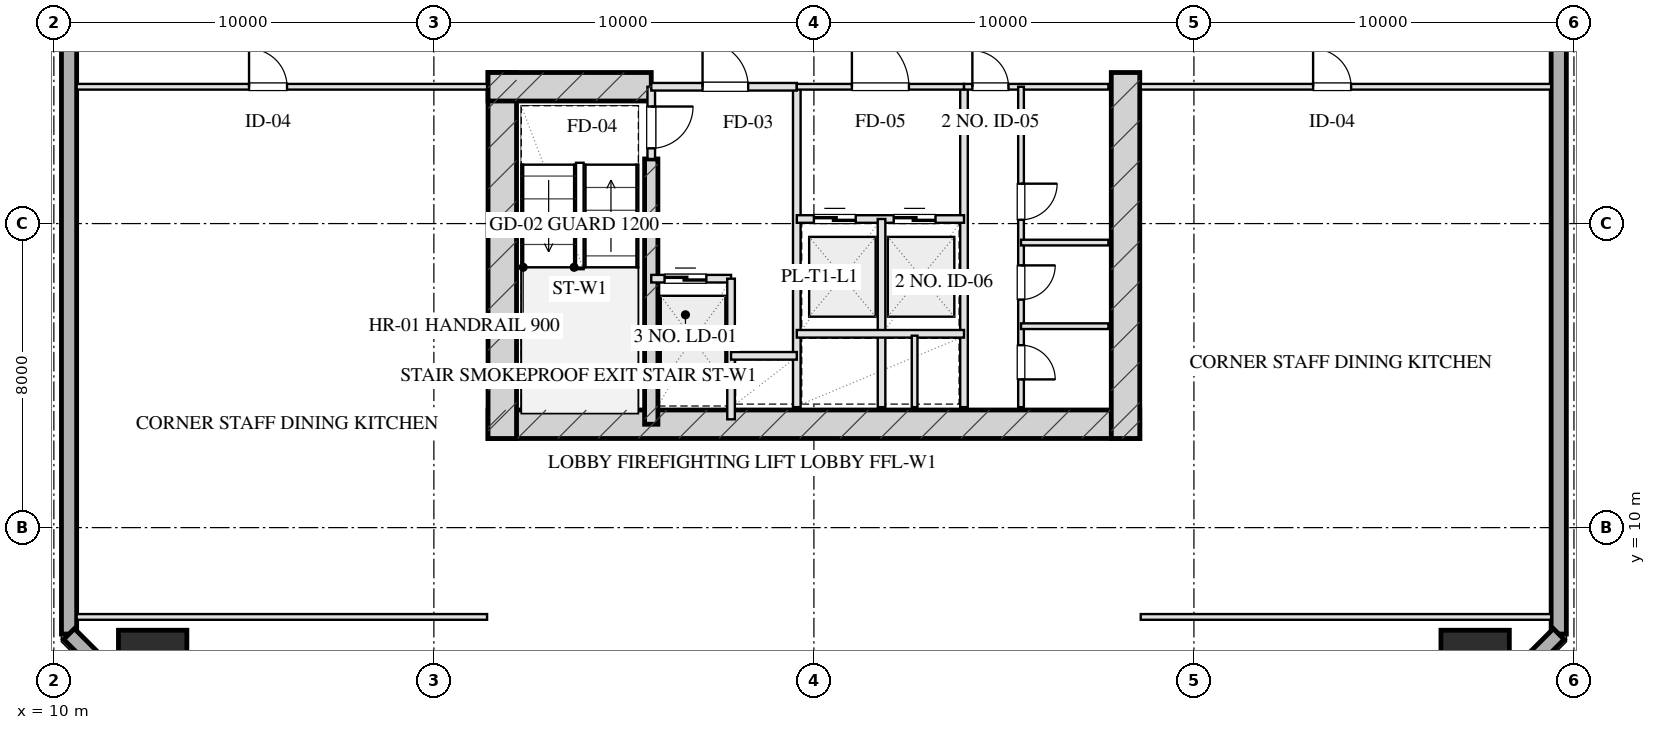
"""IFC4 building model, lengths in metres.
Left out: names, types, materials, properties, quantities, classifications, styles, units other than length and angle.
Written with IfcOpenShell. Run it as: python <this file> out.ifc"""

import sys

from ifc_helpers import new_model, si_unit, direction, frame, frame_2d, origin, origin_2d, place, context, subcontext, project, spatial, rectangle, hollow_rectangle, extrude, element, fill, save


model = new_model("IFC4")
c1 = context("Model", 3, precision=1e-05, world=origin(), true_north=direction((0.0, 1.0)))
c2 = subcontext(c1, "Body", "Model", "MODEL_VIEW")
j1 = project(units=[si_unit("LENGTHUNIT", "METRE"), si_unit("PLANEANGLEUNIT", "RADIAN")], contexts=[c1])
p1 = place(None, origin())
s1 = spatial("IfcSite", under=j1, at=p1, CompositionType="ELEMENT")
p2 = place(p1, origin())
s2 = spatial("IfcBuilding", under=s1, at=p2, CompositionType="ELEMENT")
p3 = place(p2, frame((0.0, 0.0, 64.4)))
s3 = spatial("IfcBuildingStorey", under=s2, at=p3, CompositionType="ELEMENT", Elevation=64.4)
p4 = place(p3, frame((21.425, 12.72, 0.0), z_axis=(0.0, 0.0, 1.0), x_axis=(1.0, 0.0, 0.0)))
e1 = element("IfcWall", 1, at=p4, inside=s3, PredefinedType="SHEAR", context=c2, shape_type="SweptSolid", body=[
    extrude(rectangle(XDim=17.15, YDim=0.75, at=frame_2d((8.575, 0.0))), origin(), (0.0, 0.0, 1.0), 3.45),
])
for number, where, z_axis, x_axis in (
    (2, (21.8, 21.975, 0.0), (0.0, 0.0, 1.0), (0.0, -1.0, 0.0)),
    (3, (38.2, 21.975, 0.0), (0.0, 0.0, 1.0), (0.0, -1.0, 0.0)),
):
    element("IfcWall", number, at=place(p3, frame(where, z_axis=z_axis, x_axis=x_axis)), inside=s3, PredefinedType="SHEAR", context=c2, shape_type="SweptSolid", body=[
        extrude(rectangle(XDim=9.63, YDim=0.75, at=frame_2d((4.815, 0.0))), origin(), (0.0, 0.0, 1.0), 3.45),
    ])
p5 = place(p3, frame((25.72, 19.7, 0.0), z_axis=(0.0, 0.0, 1.0), x_axis=(0.0, -1.0, 0.0)))
e4 = element("IfcWall", 4, at=p5, inside=s3, PredefinedType="SHEAR", context=c2, shape_type="SweptSolid", body=[
    extrude(rectangle(XDim=6.98, YDim=0.35, at=frame_2d((3.49, 0.0))), origin(), (0.0, 0.0, 1.0), 3.45),
])
p6 = place(p3, frame((21.425, 21.6, 0.0), z_axis=(0.0, 0.0, 1.0), x_axis=(1.0, 0.0, 0.0)))
e5 = element("IfcWall", 5, at=p6, inside=s3, PredefinedType="SHEAR", context=c2, shape_type="SweptSolid", body=[
    extrude(rectangle(XDim=4.295, YDim=0.75, at=frame_2d((2.147, 0.0))), origin(), (0.0, 0.0, 1.0), 3.45),
])
for number, where, z_axis, x_axis in (
    (6, (12.6, 6.4, 0.0), (0.0, 0.0, 1.0), (1.0, 0.0, 0.0)),
    (7, (47.4, 6.4, 0.0), (0.0, 0.0, 1.0), (1.0, 0.0, 0.0)),
):
    element("IfcColumn", number, at=place(p3, frame(where, z_axis=z_axis, x_axis=x_axis)), inside=s3, PredefinedType="COLUMN", context=c2, shape_type="SweptSolid", body=[
        extrude(hollow_rectangle(XDim=1.8, YDim=1.8, WallThickness=0.06, at=origin_2d()), origin(), (0.0, 0.0, 1.0), 3.451),
    ])
p7 = place(p3, frame((10.4, 7.2, 0.0), z_axis=(0.0, 0.0, 1.0), x_axis=(0.0, 1.0, 0.0)))
e8 = element("IfcWall", 8, at=p7, inside=s3, PredefinedType="SOLIDWALL", context=c2, shape_type="SweptSolid", body=[
    extrude(rectangle(XDim=53.6, YDim=0.4, at=frame_2d((26.8, 0.0))), origin(), (0.0, 0.0, 1.0), 2.61),
])
p8 = place(p7, frame((19.15, 0.0, 0.75)))
e9 = element("IfcOpeningElement", 9, at=p8, cuts=e8, PredefinedType="OPENING", context=c2, shape_type="SweptSolid", body=[
    extrude(rectangle(XDim=2.5, YDim=1.46, at=frame_2d((1.25, 0.73))), frame((0.0, 0.21, 0.0), z_axis=(0.0, -1.0, 0.0), x_axis=(1.0, 0.0, 0.0)), (0.0, 0.0, 1.0), 0.42),
])
p9 = place(p7, frame((31.95, 0.0, 0.75)))
e10 = element("IfcOpeningElement", 10, at=p9, cuts=e8, PredefinedType="OPENING", context=c2, shape_type="SweptSolid", body=[
    extrude(rectangle(XDim=2.5, YDim=1.46, at=frame_2d((1.25, 0.73))), frame((0.0, 0.21, 0.0), z_axis=(0.0, -1.0, 0.0), x_axis=(1.0, 0.0, 0.0)), (0.0, 0.0, 1.0), 0.42),
])
p10 = place(p3, frame((49.6, 60.8, 0.0), z_axis=(0.0, 0.0, 1.0), x_axis=(0.0, -1.0, 0.0)))
e11 = element("IfcWall", 11, at=p10, inside=s3, PredefinedType="SOLIDWALL", context=c2, shape_type="SweptSolid", body=[
    extrude(rectangle(XDim=53.6, YDim=0.4, at=frame_2d((26.8, 0.0))), origin(), (0.0, 0.0, 1.0), 2.61),
])
p11 = place(p10, frame((28.15, 0.0, 0.75)))
e12 = element("IfcOpeningElement", 12, at=p11, cuts=e11, PredefinedType="OPENING", context=c2, shape_type="SweptSolid", body=[
    extrude(rectangle(XDim=2.5, YDim=1.46, at=frame_2d((1.25, 0.73))), frame((0.0, 0.21, 0.0), z_axis=(0.0, -1.0, 0.0), x_axis=(1.0, 0.0, 0.0)), (0.0, 0.0, 1.0), 0.42),
])
p12 = place(p10, frame((22.95, 0.0, 0.75)))
e13 = element("IfcOpeningElement", 13, at=p12, cuts=e11, PredefinedType="OPENING", context=c2, shape_type="SweptSolid", body=[
    extrude(rectangle(XDim=2.5, YDim=1.46, at=frame_2d((1.25, 0.73))), frame((0.0, 0.21, 0.0), z_axis=(0.0, -1.0, 0.0), x_axis=(1.0, 0.0, 0.0)), (0.0, 0.0, 1.0), 0.42),
])
for number, where, z_axis, x_axis in (
    (14, (49.6, 7.2, 0.0), (0.0, 0.0, 1.0), (-0.707, -0.707, 0.0)),
    (15, (13.4, 4.2, 0.0), (0.0, 0.0, 1.0), (-0.707, 0.707, 0.0)),
):
    element("IfcWall", number, at=place(p3, frame(where, z_axis=z_axis, x_axis=x_axis)), inside=s3, PredefinedType="SOLIDWALL", context=c2, shape_type="SweptSolid", body=[
        extrude(rectangle(XDim=4.243, YDim=0.4, at=frame_2d((2.121, 0.0))), origin(), (0.0, 0.0, 1.0), 2.61),
    ])
p13 = place(p3, frame((25.72, 21.6, 0.0), z_axis=(0.0, 0.0, 1.0), x_axis=(0.0, -1.0, 0.0)))
e16 = element("IfcWall", 16, at=p13, inside=s3, PredefinedType="PARTITIONING", context=c2, shape_type="SweptSolid", body=[
    extrude(rectangle(XDim=1.9, YDim=0.2, at=frame_2d((0.95, 0.0))), origin(), (0.0, 0.0, 1.0), 3.175),
])
p14 = place(p13, frame((0.52, 0.0, 0.0)))
e17 = element("IfcOpeningElement", 17, at=p14, cuts=e16, PredefinedType="OPENING", context=c2, shape_type="SweptSolid", body=[
    extrude(rectangle(XDim=1.1, YDim=2.05, at=frame_2d((0.55, 1.025))), frame((0.0, 0.11, 0.0), z_axis=(0.0, -1.0, 0.0), x_axis=(1.0, 0.0, 0.0)), (0.0, 0.0, 1.0), 0.22),
])
p15 = place(p3, frame((29.55, 21.6, 0.0), z_axis=(0.0, 0.0, 1.0), x_axis=(0.0, -1.0, 0.0)))
e18 = element("IfcWall", 18, at=p15, inside=s3, PredefinedType="PARTITIONING", context=c2, shape_type="SweptSolid", body=[
    extrude(rectangle(XDim=8.43, YDim=0.2, at=frame_2d((4.215, 0.0))), origin(), (0.0, 0.0, 1.0), 3.175),
])
p16 = place(p3, frame((25.72, 21.6, 0.0), z_axis=(0.0, 0.0, 1.0), x_axis=(1.0, 0.0, 0.0)))
e19 = element("IfcWall", 19, at=p16, inside=s3, PredefinedType="PARTITIONING", context=c2, shape_type="SweptSolid", body=[
    extrude(rectangle(XDim=3.83, YDim=0.2, at=frame_2d((1.915, 0.0))), origin(), (0.0, 0.0, 1.0), 3.175),
])
p17 = place(p16, frame((1.35, 0.0, 0.0)))
e20 = element("IfcOpeningElement", 20, at=p17, cuts=e19, PredefinedType="OPENING", context=c2, shape_type="SweptSolid", body=[
    extrude(rectangle(XDim=1.2, YDim=2.05, at=frame_2d((0.6, 1.025))), frame((0.0, 0.11, 0.0), z_axis=(0.0, -1.0, 0.0), x_axis=(1.0, 0.0, 0.0)), (0.0, 0.0, 1.0), 0.22),
])
p18 = place(p3, frame((25.72, 16.55, 0.0), z_axis=(0.0, 0.0, 1.0), x_axis=(1.0, 0.0, 0.0)))
e21 = element("IfcWall", 21, at=p18, inside=s3, PredefinedType="PARTITIONING", context=c2, shape_type="SweptSolid", body=[
    extrude(rectangle(XDim=2.1, YDim=0.2, at=frame_2d((1.05, 0.0))), origin(), (0.0, 0.0, 1.0), 3.175),
])
p19 = place(p18, frame((0.35, 0.0, 0.0)))
e22 = element("IfcOpeningElement", 22, at=p19, cuts=e21, PredefinedType="OPENING", context=c2, shape_type="SweptSolid", body=[
    extrude(rectangle(XDim=1.1, YDim=2.05, at=frame_2d((0.55, 1.025))), frame((0.0, 0.11, 0.0), z_axis=(0.0, -1.0, 0.0), x_axis=(1.0, 0.0, 0.0)), (0.0, 0.0, 1.0), 0.22),
])
p20 = place(p3, frame((27.82, 16.55, 0.0), z_axis=(0.0, 0.0, 1.0), x_axis=(0.0, -1.0, 0.0)))
e23 = element("IfcWall", 23, at=p20, inside=s3, PredefinedType="PARTITIONING", context=c2, shape_type="SweptSolid", body=[
    extrude(rectangle(XDim=3.7, YDim=0.2, at=frame_2d((1.85, 0.0))), origin(), (0.0, 0.0, 1.0), 3.175),
])
p21 = place(p3, frame((27.82, 14.52, 0.0), z_axis=(0.0, 0.0, 1.0), x_axis=(1.0, 0.0, 0.0)))
e24 = element("IfcWall", 24, at=p21, inside=s3, PredefinedType="PARTITIONING", context=c2, shape_type="SweptSolid", body=[
    extrude(rectangle(XDim=1.73, YDim=0.2, at=frame_2d((0.865, 0.0))), origin(), (0.0, 0.0, 1.0), 3.175),
])
p22 = place(p3, frame((33.95, 21.6, 0.0), z_axis=(0.0, 0.0, 1.0), x_axis=(0.0, -1.0, 0.0)))
e25 = element("IfcWall", 25, at=p22, inside=s3, PredefinedType="PARTITIONING", context=c2, shape_type="SweptSolid", body=[
    extrude(rectangle(XDim=8.43, YDim=0.2, at=frame_2d((4.215, 0.0))), origin(), (0.0, 0.0, 1.0), 3.175),
])
p23 = place(p3, frame((29.55, 21.6, 0.0), z_axis=(0.0, 0.0, 1.0), x_axis=(1.0, 0.0, 0.0)))
e26 = element("IfcWall", 26, at=p23, inside=s3, PredefinedType="PARTITIONING", context=c2, shape_type="SweptSolid", body=[
    extrude(rectangle(XDim=4.4, YDim=0.15, at=frame_2d((2.2, 0.0))), origin(), (0.0, 0.0, 1.0), 3.175),
])
p24 = place(p23, frame((1.45, 0.0, 0.0)))
e27 = element("IfcOpeningElement", 27, at=p24, cuts=e26, PredefinedType="OPENING", context=c2, shape_type="SweptSolid", body=[
    extrude(rectangle(XDim=1.5, YDim=2.05, at=frame_2d((0.75, 1.025))), frame((0.0, 0.085, 0.0), z_axis=(0.0, -1.0, 0.0), x_axis=(1.0, 0.0, 0.0)), (0.0, 0.0, 1.0), 0.17),
])
p25 = place(p3, frame((29.55, 18.12, 0.0), z_axis=(0.0, 0.0, 1.0), x_axis=(1.0, 0.0, 0.0)))
e28 = element("IfcWall", 28, at=p25, inside=s3, PredefinedType="PARTITIONING", context=c2, shape_type="SweptSolid", body=[
    extrude(rectangle(XDim=4.4, YDim=0.2, at=frame_2d((2.2, 0.0))), origin(), (0.0, 0.0, 1.0), 3.175),
])
p26 = place(p25, frame((0.45, 0.0, 0.0)))
e29 = element("IfcOpeningElement", 29, at=p26, cuts=e28, PredefinedType="OPENING", context=c2, shape_type="SweptSolid", body=[
    extrude(rectangle(XDim=1.1, YDim=2.05, at=frame_2d((0.55, 1.025))), frame((0.0, 0.11, 0.0), z_axis=(0.0, -1.0, 0.0), x_axis=(1.0, 0.0, 0.0)), (0.0, 0.0, 1.0), 0.22),
])
p27 = place(p25, frame((2.55, 0.0, 0.0)))
e30 = element("IfcOpeningElement", 30, at=p27, cuts=e28, PredefinedType="OPENING", context=c2, shape_type="SweptSolid", body=[
    extrude(rectangle(XDim=1.1, YDim=2.05, at=frame_2d((0.55, 1.025))), frame((0.0, 0.11, 0.0), z_axis=(0.0, -1.0, 0.0), x_axis=(1.0, 0.0, 0.0)), (0.0, 0.0, 1.0), 0.22),
])
p28 = place(p3, frame((31.78, 18.12, 0.0), z_axis=(0.0, 0.0, 1.0), x_axis=(0.0, -1.0, 0.0)))
e31 = element("IfcWall", 31, at=p28, inside=s3, PredefinedType="PARTITIONING", context=c2, shape_type="SweptSolid", body=[
    extrude(rectangle(XDim=4.95, YDim=0.2, at=frame_2d((2.475, 0.0))), origin(), (0.0, 0.0, 1.0), 3.175),
])
p29 = place(p3, frame((29.55, 15.1, 0.0), z_axis=(0.0, 0.0, 1.0), x_axis=(1.0, 0.0, 0.0)))
e32 = element("IfcWall", 32, at=p29, inside=s3, PredefinedType="PARTITIONING", context=c2, shape_type="SweptSolid", body=[
    extrude(rectangle(XDim=4.4, YDim=0.2, at=frame_2d((2.2, 0.0))), origin(), (0.0, 0.0, 1.0), 3.175),
])
p30 = place(p3, frame((32.65, 15.05, 0.0), z_axis=(0.0, 0.0, 1.0), x_axis=(0.0, -1.0, 0.0)))
e33 = element("IfcWall", 33, at=p30, inside=s3, PredefinedType="PARTITIONING", context=c2, shape_type="SweptSolid", body=[
    extrude(rectangle(XDim=1.88, YDim=0.15, at=frame_2d((0.94, 0.0))), origin(), (0.0, 0.0, 1.0), 3.175),
])
p31 = place(p3, frame((33.95, 21.6, 0.0), z_axis=(0.0, 0.0, 1.0), x_axis=(1.0, 0.0, 0.0)))
e34 = element("IfcWall", 34, at=p31, inside=s3, PredefinedType="PARTITIONING", context=c2, shape_type="SweptSolid", body=[
    extrude(rectangle(XDim=3.8, YDim=0.15, at=frame_2d((1.9, 0.0))), origin(), (0.0, 0.0, 1.0), 3.175),
])
p32 = place(p31, frame((0.22, 0.0, 0.0)))
e35 = element("IfcOpeningElement", 35, at=p32, cuts=e34, PredefinedType="OPENING", context=c2, shape_type="SweptSolid", body=[
    extrude(rectangle(XDim=0.95, YDim=2.05, at=frame_2d((0.475, 1.025))), frame((0.0, 0.085, 0.0), z_axis=(0.0, -1.0, 0.0), x_axis=(1.0, 0.0, 0.0)), (0.0, 0.0, 1.0), 0.17),
])
p33 = place(p3, frame((35.45, 21.6, 0.0), z_axis=(0.0, 0.0, 1.0), x_axis=(0.0, -1.0, 0.0)))
e36 = element("IfcWall", 36, at=p33, inside=s3, PredefinedType="PARTITIONING", context=c2, shape_type="SweptSolid", body=[
    extrude(rectangle(XDim=8.43, YDim=0.15, at=frame_2d((4.215, 0.0))), origin(), (0.0, 0.0, 1.0), 2.815),
])
p34 = place(p33, frame((2.55, 0.0, 0.0)))
e37 = element("IfcOpeningElement", 37, at=p34, cuts=e36, PredefinedType="OPENING", context=c2, shape_type="SweptSolid", body=[
    extrude(rectangle(XDim=0.95, YDim=2.05, at=frame_2d((0.475, 1.025))), frame((0.0, 0.085, 0.0), z_axis=(0.0, -1.0, 0.0), x_axis=(1.0, 0.0, 0.0)), (0.0, 0.0, 1.0), 0.17),
])
p35 = place(p33, frame((4.7, 0.0, 0.0)))
e38 = element("IfcOpeningElement", 38, at=p35, cuts=e36, PredefinedType="OPENING", context=c2, shape_type="SweptSolid", body=[
    extrude(rectangle(XDim=0.9, YDim=2.05, at=frame_2d((0.45, 1.025))), frame((0.0, 0.085, 0.0), z_axis=(0.0, -1.0, 0.0), x_axis=(1.0, 0.0, 0.0)), (0.0, 0.0, 1.0), 0.17),
])
p36 = place(p33, frame((6.8, 0.0, 0.0)))
e39 = element("IfcOpeningElement", 39, at=p36, cuts=e36, PredefinedType="OPENING", context=c2, shape_type="SweptSolid", body=[
    extrude(rectangle(XDim=0.9, YDim=2.05, at=frame_2d((0.45, 1.025))), frame((0.0, 0.085, 0.0), z_axis=(0.0, -1.0, 0.0), x_axis=(1.0, 0.0, 0.0)), (0.0, 0.0, 1.0), 0.17),
])
for number, where, z_axis, x_axis in (
    (40, (35.45, 17.5, 0.0), (0.0, 0.0, 1.0), (1.0, 0.0, 0.0)),
    (41, (35.45, 15.3, 0.0), (0.0, 0.0, 1.0), (1.0, 0.0, 0.0)),
):
    element("IfcWall", number, at=place(p3, frame(where, z_axis=z_axis, x_axis=x_axis)), inside=s3, PredefinedType="PARTITIONING", context=c2, shape_type="SweptSolid", body=[
        extrude(rectangle(XDim=2.3, YDim=0.15, at=frame_2d((1.15, 0.0))), origin(), (0.0, 0.0, 1.0), 3.175),
    ])
p37 = place(p3, frame((10.6, 7.65, 0.0), z_axis=(0.0, 0.0, 1.0), x_axis=(1.0, 0.0, 0.0)))
e42 = element("IfcWall", 42, at=p37, inside=s3, PredefinedType="PARTITIONING", context=c2, shape_type="SweptSolid", body=[
    extrude(rectangle(XDim=10.8, YDim=0.15, at=frame_2d((5.4, 0.0))), origin(), (0.0, 0.0, 1.0), 3.175),
])
p38 = place(p3, frame((10.6, 21.6, 0.0), z_axis=(0.0, 0.0, 1.0), x_axis=(1.0, 0.0, 0.0)))
e43 = element("IfcWall", 43, at=p38, inside=s3, PredefinedType="PARTITIONING", context=c2, shape_type="SweptSolid", body=[
    extrude(rectangle(XDim=10.8, YDim=0.15, at=frame_2d((5.4, 0.0))), origin(), (0.0, 0.0, 1.0), 3.175),
])
p39 = place(p38, frame((4.536, 0.0, 0.0)))
e44 = element("IfcOpeningElement", 44, at=p39, cuts=e43, PredefinedType="OPENING", context=c2, shape_type="SweptSolid", body=[
    extrude(rectangle(XDim=1.0, YDim=2.05, at=frame_2d((0.5, 1.025))), frame((0.0, 0.085, 0.0), z_axis=(0.0, -1.0, 0.0), x_axis=(1.0, 0.0, 0.0)), (0.0, 0.0, 1.0), 0.17),
])
p40 = place(p3, frame((38.6, 7.65, 0.0), z_axis=(0.0, 0.0, 1.0), x_axis=(1.0, 0.0, 0.0)))
e45 = element("IfcWall", 45, at=p40, inside=s3, PredefinedType="PARTITIONING", context=c2, shape_type="SweptSolid", body=[
    extrude(rectangle(XDim=10.8, YDim=0.15, at=frame_2d((5.4, 0.0))), origin(), (0.0, 0.0, 1.0), 3.175),
])
p41 = place(p3, frame((38.6, 21.6, 0.0), z_axis=(0.0, 0.0, 1.0), x_axis=(1.0, 0.0, 0.0)))
e46 = element("IfcWall", 46, at=p41, inside=s3, PredefinedType="PARTITIONING", context=c2, shape_type="SweptSolid", body=[
    extrude(rectangle(XDim=10.8, YDim=0.15, at=frame_2d((5.4, 0.0))), origin(), (0.0, 0.0, 1.0), 3.175),
])
p42 = place(p41, frame((4.536, 0.0, 0.0)))
e47 = element("IfcOpeningElement", 47, at=p42, cuts=e46, PredefinedType="OPENING", context=c2, shape_type="SweptSolid", body=[
    extrude(rectangle(XDim=1.0, YDim=2.05, at=frame_2d((0.5, 1.025))), frame((0.0, 0.085, 0.0), z_axis=(0.0, -1.0, 0.0), x_axis=(1.0, 0.0, 0.0)), (0.0, 0.0, 1.0), 0.17),
])
p43 = place(p14, origin())
e48 = element("IfcDoor", 48, at=p43, inside=s3, OperationType="SINGLE_SWING_LEFT", PredefinedType="DOOR", context=c2, shape_type="SweptSolid", body=[
    extrude(rectangle(XDim=1.1, YDim=2.05, at=frame_2d((0.55, 1.025))), frame((0.0, 0.025, 0.0), z_axis=(0.0, -1.0, 0.0), x_axis=(1.0, 0.0, 0.0)), (0.0, 0.0, 1.0), 0.05),
])
fill(e17, e48)
p44 = place(p17, origin())
e49 = element("IfcDoor", 49, at=p44, inside=s3, OperationType="SINGLE_SWING_LEFT", PredefinedType="DOOR", context=c2, shape_type="SweptSolid", body=[
    extrude(rectangle(XDim=1.2, YDim=2.05, at=frame_2d((0.6, 1.025))), frame((0.0, 0.025, 0.0), z_axis=(0.0, -1.0, 0.0), x_axis=(1.0, 0.0, 0.0)), (0.0, 0.0, 1.0), 0.05),
])
fill(e20, e49)
p45 = place(p19, origin())
e50 = element("IfcDoor", 50, at=p45, inside=s3, OperationType="DOUBLE_DOOR_SLIDING", PredefinedType="DOOR", context=c2, shape_type="SweptSolid", body=[
    extrude(rectangle(XDim=1.1, YDim=2.05, at=frame_2d((0.55, 1.025))), frame((0.0, 0.025, 0.0), z_axis=(0.0, -1.0, 0.0), x_axis=(1.0, 0.0, 0.0)), (0.0, 0.0, 1.0), 0.05),
])
fill(e22, e50)
p46 = place(p24, origin())
e51 = element("IfcDoor", 51, at=p46, inside=s3, OperationType="SINGLE_SWING_LEFT", PredefinedType="DOOR", context=c2, shape_type="SweptSolid", body=[
    extrude(rectangle(XDim=1.5, YDim=2.05, at=frame_2d((0.75, 1.025))), frame((0.0, 0.025, 0.0), z_axis=(0.0, -1.0, 0.0), x_axis=(1.0, 0.0, 0.0)), (0.0, 0.0, 1.0), 0.05),
])
fill(e27, e51)
p47 = place(p26, origin())
e52 = element("IfcDoor", 52, at=p47, inside=s3, OperationType="DOUBLE_DOOR_SLIDING", PredefinedType="DOOR", context=c2, shape_type="SweptSolid", body=[
    extrude(rectangle(XDim=1.1, YDim=2.05, at=frame_2d((0.55, 1.025))), frame((0.0, 0.025, 0.0), z_axis=(0.0, -1.0, 0.0), x_axis=(1.0, 0.0, 0.0)), (0.0, 0.0, 1.0), 0.05),
])
fill(e29, e52)
p48 = place(p27, origin())
e53 = element("IfcDoor", 53, at=p48, inside=s3, OperationType="DOUBLE_DOOR_SLIDING", PredefinedType="DOOR", context=c2, shape_type="SweptSolid", body=[
    extrude(rectangle(XDim=1.1, YDim=2.05, at=frame_2d((0.55, 1.025))), frame((0.0, 0.025, 0.0), z_axis=(0.0, -1.0, 0.0), x_axis=(1.0, 0.0, 0.0)), (0.0, 0.0, 1.0), 0.05),
])
fill(e30, e53)
p49 = place(p32, origin())
e54 = element("IfcDoor", 54, at=p49, inside=s3, OperationType="SINGLE_SWING_LEFT", PredefinedType="DOOR", context=c2, shape_type="SweptSolid", body=[
    extrude(rectangle(XDim=0.95, YDim=2.05, at=frame_2d((0.475, 1.025))), frame((0.0, 0.025, 0.0), z_axis=(0.0, -1.0, 0.0), x_axis=(1.0, 0.0, 0.0)), (0.0, 0.0, 1.0), 0.05),
])
fill(e35, e54)
p50 = place(p34, origin())
e55 = element("IfcDoor", 55, at=p50, inside=s3, OperationType="SINGLE_SWING_LEFT", PredefinedType="DOOR", context=c2, shape_type="SweptSolid", body=[
    extrude(rectangle(XDim=0.95, YDim=2.05, at=frame_2d((0.475, 1.025))), frame((0.0, 0.025, 0.0), z_axis=(0.0, -1.0, 0.0), x_axis=(1.0, 0.0, 0.0)), (0.0, 0.0, 1.0), 0.05),
])
fill(e37, e55)
p51 = place(p35, origin())
e56 = element("IfcDoor", 56, at=p51, inside=s3, OperationType="SINGLE_SWING_LEFT", PredefinedType="DOOR", context=c2, shape_type="SweptSolid", body=[
    extrude(rectangle(XDim=0.9, YDim=2.05, at=frame_2d((0.45, 1.025))), frame((0.0, 0.025, 0.0), z_axis=(0.0, -1.0, 0.0), x_axis=(1.0, 0.0, 0.0)), (0.0, 0.0, 1.0), 0.05),
])
fill(e38, e56)
p52 = place(p36, origin())
e57 = element("IfcDoor", 57, at=p52, inside=s3, OperationType="SINGLE_SWING_RIGHT", PredefinedType="DOOR", context=c2, shape_type="SweptSolid", body=[
    extrude(rectangle(XDim=0.9, YDim=2.05, at=frame_2d((0.45, 1.025))), frame((0.0, 0.025, 0.0), z_axis=(0.0, -1.0, 0.0), x_axis=(1.0, 0.0, 0.0)), (0.0, 0.0, 1.0), 0.05),
])
fill(e39, e57)
p53 = place(p39, origin())
e58 = element("IfcDoor", 58, at=p53, inside=s3, OperationType="SINGLE_SWING_LEFT", PredefinedType="DOOR", context=c2, shape_type="SweptSolid", body=[
    extrude(rectangle(XDim=1.0, YDim=2.05, at=frame_2d((0.5, 1.025))), frame((0.0, 0.025, 0.0), z_axis=(0.0, -1.0, 0.0), x_axis=(1.0, 0.0, 0.0)), (0.0, 0.0, 1.0), 0.05),
])
fill(e44, e58)
p54 = place(p42, origin())
e59 = element("IfcDoor", 59, at=p54, inside=s3, OperationType="SINGLE_SWING_LEFT", PredefinedType="DOOR", context=c2, shape_type="SweptSolid", body=[
    extrude(rectangle(XDim=1.0, YDim=2.05, at=frame_2d((0.5, 1.025))), frame((0.0, 0.025, 0.0), z_axis=(0.0, -1.0, 0.0), x_axis=(1.0, 0.0, 0.0)), (0.0, 0.0, 1.0), 0.05),
])
fill(e47, e59)
save(model, sys.argv[1])
